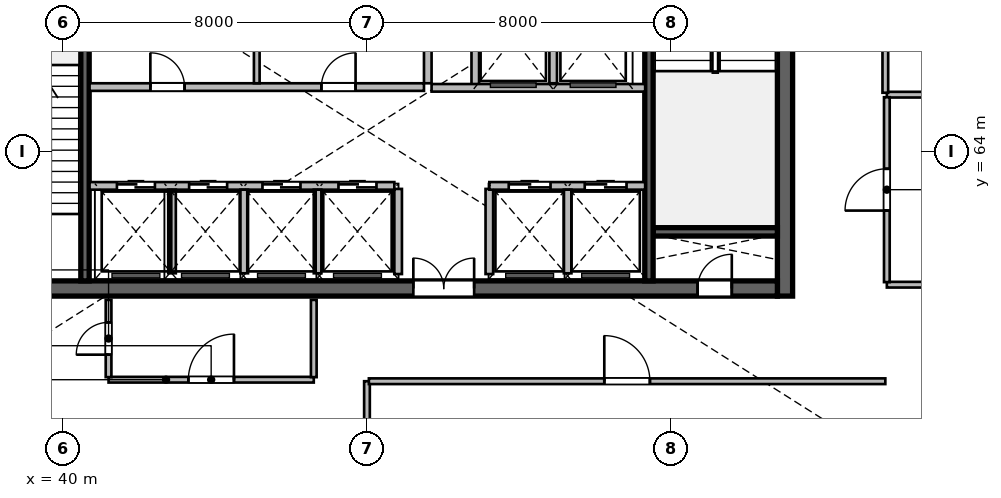
"""IFC4 building model, lengths in metres.
Left out: names, types, materials, properties, quantities, classifications, styles, units other than length and angle.
Written with IfcOpenShell. Run it as: python <this file> out.ifc"""

import sys

from ifc_helpers import new_model, si_unit, direction, frame, frame_2d, origin, place, context, subcontext, project, spatial, rectangle, extrude, source, transform, mapped, element, fill, save


model = new_model("IFC4")
c1 = context("Model", 3, precision=1e-05, world=origin(), true_north=direction((0.0, 1.0)))
c2 = subcontext(c1, "Body", "Model", "MODEL_VIEW")
j1 = project(units=[si_unit("LENGTHUNIT", "METRE"), si_unit("PLANEANGLEUNIT", "RADIAN")], contexts=[c1])
p1 = place(None, origin())
s1 = spatial("IfcSite", under=j1, at=p1, CompositionType="ELEMENT")
p2 = place(p1, origin())
s2 = spatial("IfcBuilding", under=s1, at=p2, CompositionType="ELEMENT")
p3 = place(p2, frame((0.0, 0.0, 312.6)))
s3 = spatial("IfcBuildingStorey", under=s2, at=p3, CompositionType="ELEMENT", Elevation=312.6)
m1 = source(origin(), c2, "Body", "SweptSolid", [
    extrude(rectangle(XDim=12.0, YDim=0.4, at=frame_2d((6.0, 0.0))), origin(), (0.0, 0.0, 1.0), 5.4),
])
p4 = place(p3, frame((59.0, 60.2, 0.0), z_axis=(0.0, 0.0, 1.0), x_axis=(0.0, 1.0, 0.0)))
e1 = element("IfcWall", 1, at=p4, inside=s3, PredefinedType="SHEAR", context=c2, shape_type="MappedRepresentation", body=[
    mapped(m1, transform((0.0, 0.0, 0.0), scale=1.0)),
])
m2 = source(origin(), c2, "Body", "SweptSolid", [
    extrude(rectangle(XDim=21.6, YDim=0.4, at=frame_2d((10.8, 0.0))), origin(), (0.0, 0.0, 1.0), 5.4),
])
p5 = place(p3, frame((37.2, 60.4, 0.0), z_axis=(0.0, 0.0, 1.0), x_axis=(1.0, 0.0, 0.0)))
e2 = element("IfcWall", 2, at=p5, inside=s3, PredefinedType="SHEAR", context=c2, shape_type="MappedRepresentation", body=[
    mapped(m2, transform((0.0, 0.0, 0.0), scale=1.0)),
])
p6 = place(p5, frame((1.1, 0.0, 0.0)))
e3 = element("IfcOpeningElement", 3, at=p6, cuts=e2, PredefinedType="OPENING", context=c2, shape_type="SweptSolid", body=[
    extrude(rectangle(XDim=1.15, YDim=2.15, at=frame_2d((0.575, 1.075))), frame((0.0, 0.21, 0.0), z_axis=(0.0, -1.0, 0.0), x_axis=(1.0, 0.0, 0.0)), (0.0, 0.0, 1.0), 0.42),
])
p7 = place(p5, frame((19.5, 0.0, 0.0)))
e4 = element("IfcOpeningElement", 4, at=p7, cuts=e2, PredefinedType="OPENING", context=c2, shape_type="SweptSolid", body=[
    extrude(rectangle(XDim=0.9, YDim=2.1, at=frame_2d((0.45, 1.05))), frame((0.0, 0.21, 0.0), z_axis=(0.0, -1.0, 0.0), x_axis=(1.0, 0.0, 0.0)), (0.0, 0.0, 1.0), 0.42),
])
p8 = place(p5, frame((12.02, 0.0, 0.0)))
e5 = element("IfcOpeningElement", 5, at=p8, cuts=e2, PredefinedType="OPENING", context=c2, shape_type="SweptSolid", body=[
    extrude(rectangle(XDim=1.6, YDim=2.15, at=frame_2d((0.8, 1.075))), frame((0.0, 0.21, 0.0), z_axis=(0.0, -1.0, 0.0), x_axis=(1.0, 0.0, 0.0)), (0.0, 0.0, 1.0), 0.42),
])
m3 = source(origin(), c2, "Body", "SweptSolid", [
    extrude(rectangle(XDim=3.27, YDim=0.22, at=frame_2d((1.635, 0.0))), origin(), (0.0, 0.0, 1.0), 5.4),
])
p9 = place(p3, frame((55.53, 61.89, 0.0), z_axis=(0.0, 0.0, 1.0), x_axis=(1.0, 0.0, 0.0)))
e6 = element("IfcWall", 6, at=p9, inside=s3, PredefinedType="SHEAR", context=c2, shape_type="MappedRepresentation", body=[
    mapped(m3, transform((0.0, 0.0, 0.0), scale=1.0)),
])
m4 = source(origin(), c2, "Body", "SweptSolid", [
    extrude(rectangle(XDim=11.2, YDim=0.22, at=frame_2d((5.6, 0.0))), origin(), (0.0, 0.0, 1.0), 5.4),
])
p10 = place(p3, frame((40.58, 60.6, 0.0), z_axis=(0.0, 0.0, 1.0), x_axis=(0.0, 1.0, 0.0)))
e7 = element("IfcWall", 7, at=p10, inside=s3, PredefinedType="SHEAR", context=c2, shape_type="MappedRepresentation", body=[
    mapped(m4, transform((0.0, 0.0, 0.0), scale=1.0)),
])
p11 = place(p3, frame((55.42, 60.6, 0.0), z_axis=(0.0, 0.0, 1.0), x_axis=(0.0, 1.0, 0.0)))
e8 = element("IfcWall", 8, at=p11, inside=s3, PredefinedType="SHEAR", context=c2, shape_type="MappedRepresentation", body=[
    mapped(m4, transform((0.0, 0.0, 0.0), scale=1.0)),
])
p12 = place(p11, frame((9.645, 0.0, 0.0)))
e9 = element("IfcOpeningElement", 9, at=p12, cuts=e8, PredefinedType="OPENING", context=c2, shape_type="SweptSolid", body=[
    extrude(rectangle(XDim=1.15, YDim=2.15, at=frame_2d((0.575, 1.075))), frame((0.0, 0.12, 0.0), z_axis=(0.0, -1.0, 0.0), x_axis=(1.0, 0.0, 0.0)), (0.0, 0.0, 1.0), 0.24),
])
m5 = source(origin(), c2, "Body", "SweptSolid", [
    extrude(rectangle(XDim=2.24, YDim=0.2, at=frame_2d((1.12, 0.0))), origin(), (0.0, 0.0, 1.0), 5.12),
])
for number, where, z_axis, x_axis in (
    (10, (48.82, 60.78, 0.0), (0.0, 0.0, 1.0), (0.0, 1.0, 0.0)),
    (11, (51.22, 60.78, 0.0), (0.0, 0.0, 1.0), (0.0, 1.0, 0.0)),
):
    element("IfcWall", number, at=place(p3, frame(where, z_axis=z_axis, x_axis=x_axis)), inside=s3, PredefinedType="SOLIDWALL", context=c2, shape_type="MappedRepresentation", body=[
        mapped(m5, transform((0.0, 0.0, 0.0), scale=1.0)),
    ])
m6 = source(origin(), c2, "Body", "SweptSolid", [
    extrude(rectangle(XDim=5.8, YDim=0.2, at=frame_2d((2.9, 0.0))), origin(), (0.0, 0.0, 1.0), 5.12),
])
p13 = place(p3, frame((49.6, 65.8, 0.0), z_axis=(0.0, 0.0, 1.0), x_axis=(0.0, 1.0, 0.0)))
e12 = element("IfcWall", 12, at=p13, inside=s3, PredefinedType="SOLIDWALL", context=c2, shape_type="MappedRepresentation", body=[
    mapped(m6, transform((0.0, 0.0, 0.0), scale=1.0)),
])
m7 = source(origin(), c2, "Body", "SweptSolid", [
    extrude(rectangle(XDim=2.58, YDim=0.2, at=frame_2d((1.29, 0.0))), origin(), (0.0, 0.0, 1.0), 5.12),
])
p14 = place(p3, frame((50.85, 65.68, 0.0), z_axis=(0.0, 0.0, 1.0), x_axis=(0.0, 1.0, 0.0)))
e13 = element("IfcWall", 13, at=p14, inside=s3, PredefinedType="SOLIDWALL", context=c2, shape_type="MappedRepresentation", body=[
    mapped(m7, transform((0.0, 0.0, 0.0), scale=1.0)),
])
m8 = source(origin(), c2, "Body", "SweptSolid", [
    extrude(rectangle(XDim=2.4, YDim=0.2, at=frame_2d((1.2, 0.0))), origin(), (0.0, 0.0, 1.0), 5.12),
])
p15 = place(p3, frame((52.9, 65.8, 0.0), z_axis=(0.0, 0.0, 1.0), x_axis=(0.0, 1.0, 0.0)))
e14 = element("IfcWall", 14, at=p15, inside=s3, PredefinedType="SOLIDWALL", context=c2, shape_type="MappedRepresentation", body=[
    mapped(m8, transform((0.0, 0.0, 0.0), scale=1.0)),
])
m9 = source(origin(), c2, "Body", "SweptSolid", [
    extrude(rectangle(XDim=5.62, YDim=0.2, at=frame_2d((2.81, 0.0))), origin(), (0.0, 0.0, 1.0), 5.12),
])
p16 = place(p3, frame((49.7, 65.68, 0.0), z_axis=(0.0, 0.0, 1.0), x_axis=(1.0, 0.0, 0.0)))
e15 = element("IfcWall", 15, at=p16, inside=s3, PredefinedType="SOLIDWALL", context=c2, shape_type="MappedRepresentation", body=[
    mapped(m9, transform((0.0, 0.0, 0.0), scale=1.0)),
])
m10 = source(origin(), c2, "Body", "SweptSolid", [
    extrude(rectangle(XDim=8.02, YDim=0.2, at=frame_2d((4.01, 0.0))), origin(), (0.0, 0.0, 1.0), 5.12),
])
p17 = place(p3, frame((40.7, 63.1, 0.0), z_axis=(0.0, 0.0, 1.0), x_axis=(1.0, 0.0, 0.0)))
e16 = element("IfcWall", 16, at=p17, inside=s3, PredefinedType="SOLIDWALL", context=c2, shape_type="MappedRepresentation", body=[
    mapped(m10, transform((0.0, 0.0, 0.0), scale=1.0)),
])
p18 = place(p17, frame((0.72, 0.0, 0.0)))
e17 = element("IfcOpeningElement", 17, at=p18, cuts=e16, PredefinedType="OPENING", context=c2, shape_type="SweptSolid", body=[
    extrude(rectangle(XDim=1.0, YDim=2.15, at=frame_2d((0.5, 1.075))), frame((0.0, 0.11, 0.0), z_axis=(0.0, -1.0, 0.0), x_axis=(1.0, 0.0, 0.0)), (0.0, 0.0, 1.0), 0.22),
])
p19 = place(p17, frame((2.62, 0.0, 0.0)))
e18 = element("IfcOpeningElement", 18, at=p19, cuts=e16, PredefinedType="OPENING", context=c2, shape_type="SweptSolid", body=[
    extrude(rectangle(XDim=1.0, YDim=2.15, at=frame_2d((0.5, 1.075))), frame((0.0, 0.11, 0.0), z_axis=(0.0, -1.0, 0.0), x_axis=(1.0, 0.0, 0.0)), (0.0, 0.0, 1.0), 0.22),
])
p20 = place(p17, frame((4.55, 0.0, 0.0)))
e19 = element("IfcOpeningElement", 19, at=p20, cuts=e16, PredefinedType="OPENING", context=c2, shape_type="SweptSolid", body=[
    extrude(rectangle(XDim=1.0, YDim=2.15, at=frame_2d((0.5, 1.075))), frame((0.0, 0.11, 0.0), z_axis=(0.0, -1.0, 0.0), x_axis=(1.0, 0.0, 0.0)), (0.0, 0.0, 1.0), 0.22),
])
p21 = place(p17, frame((6.55, 0.0, 0.0)))
e20 = element("IfcOpeningElement", 20, at=p21, cuts=e16, PredefinedType="OPENING", context=c2, shape_type="SweptSolid", body=[
    extrude(rectangle(XDim=1.0, YDim=2.15, at=frame_2d((0.5, 1.075))), frame((0.0, 0.11, 0.0), z_axis=(0.0, -1.0, 0.0), x_axis=(1.0, 0.0, 0.0)), (0.0, 0.0, 1.0), 0.22),
])
m11 = source(origin(), c2, "Body", "SweptSolid", [
    extrude(rectangle(XDim=4.1, YDim=0.2, at=frame_2d((2.05, 0.0))), origin(), (0.0, 0.0, 1.0), 5.12),
])
p22 = place(p3, frame((51.22, 63.1, 0.0), z_axis=(0.0, 0.0, 1.0), x_axis=(1.0, 0.0, 0.0)))
e21 = element("IfcWall", 21, at=p22, inside=s3, PredefinedType="SOLIDWALL", context=c2, shape_type="MappedRepresentation", body=[
    mapped(m11, transform((0.0, 0.0, 0.0), scale=1.0)),
])
p23 = place(p22, frame((0.51, 0.0, 0.0)))
e22 = element("IfcOpeningElement", 22, at=p23, cuts=e21, PredefinedType="OPENING", context=c2, shape_type="SweptSolid", body=[
    extrude(rectangle(XDim=1.1, YDim=2.15, at=frame_2d((0.55, 1.075))), frame((0.0, 0.11, 0.0), z_axis=(0.0, -1.0, 0.0), x_axis=(1.0, 0.0, 0.0)), (0.0, 0.0, 1.0), 0.22),
])
p24 = place(p22, frame((2.51, 0.0, 0.0)))
e23 = element("IfcOpeningElement", 23, at=p24, cuts=e21, PredefinedType="OPENING", context=c2, shape_type="SweptSolid", body=[
    extrude(rectangle(XDim=1.1, YDim=2.15, at=frame_2d((0.55, 1.075))), frame((0.0, 0.11, 0.0), z_axis=(0.0, -1.0, 0.0), x_axis=(1.0, 0.0, 0.0)), (0.0, 0.0, 1.0), 0.22),
])
m12 = source(origin(), c2, "Body", "SweptSolid", [
    extrude(rectangle(XDim=2.2, YDim=0.2, at=frame_2d((1.1, 0.0))), origin(), (0.0, 0.0, 1.0), 5.12),
])
for number, where, z_axis, x_axis in (
    (24, (42.87, 60.8, 0.0), (0.0, 0.0, 1.0), (0.0, 1.0, 0.0)),
    (25, (44.77, 60.8, 0.0), (0.0, 0.0, 1.0), (0.0, 1.0, 0.0)),
    (26, (46.7, 60.8, 0.0), (0.0, 0.0, 1.0), (0.0, 1.0, 0.0)),
    (27, (53.28, 60.8, 0.0), (0.0, 0.0, 1.0), (0.0, 1.0, 0.0)),
):
    element("IfcWall", number, at=place(p3, frame(where, z_axis=z_axis, x_axis=x_axis)), inside=s3, PredefinedType="SOLIDWALL", context=c2, shape_type="MappedRepresentation", body=[
        mapped(m12, transform((0.0, 0.0, 0.0), scale=1.0)),
    ])
m13 = source(origin(), c2, "Body", "SweptSolid", [
    extrude(rectangle(XDim=8.8, YDim=0.2, at=frame_2d((4.4, 0.0))), origin(), (0.0, 0.0, 1.0), 5.12),
])
p25 = place(p3, frame((40.7, 65.7, 0.0), z_axis=(0.0, 0.0, 1.0), x_axis=(1.0, 0.0, 0.0)))
e28 = element("IfcWall", 28, at=p25, inside=s3, PredefinedType="SOLIDWALL", context=c2, shape_type="MappedRepresentation", body=[
    mapped(m13, transform((0.0, 0.0, 0.0), scale=1.0)),
])
p26 = place(p25, frame((1.6, 0.0, 0.0)))
e29 = element("IfcOpeningElement", 29, at=p26, cuts=e28, PredefinedType="OPENING", context=c2, shape_type="SweptSolid", body=[
    extrude(rectangle(XDim=0.9, YDim=2.1, at=frame_2d((0.45, 1.05))), frame((0.0, 0.11, 0.0), z_axis=(0.0, -1.0, 0.0), x_axis=(1.0, 0.0, 0.0)), (0.0, 0.0, 1.0), 0.22),
])
p27 = place(p25, frame((6.1, 0.0, 0.0)))
e30 = element("IfcOpeningElement", 30, at=p27, cuts=e28, PredefinedType="OPENING", context=c2, shape_type="SweptSolid", body=[
    extrude(rectangle(XDim=0.9, YDim=2.1, at=frame_2d((0.45, 1.05))), frame((0.0, 0.11, 0.0), z_axis=(0.0, -1.0, 0.0), x_axis=(1.0, 0.0, 0.0)), (0.0, 0.0, 1.0), 0.22),
])
m14 = source(origin(), c2, "Body", "SweptSolid", [
    extrude(rectangle(XDim=2.4, YDim=0.15, at=frame_2d((1.2, 0.0))), origin(), (0.0, 0.0, 1.0), 5.12),
])
p28 = place(p3, frame((45.1, 65.8, 0.0), z_axis=(0.0, 0.0, 1.0), x_axis=(0.0, 1.0, 0.0)))
e31 = element("IfcWall", 31, at=p28, inside=s3, PredefinedType="PARTITIONING", context=c2, shape_type="MappedRepresentation", body=[
    mapped(m14, transform((0.0, 0.0, 0.0), scale=1.0)),
])
m15 = source(origin(), c2, "Body", "SweptSolid", [
    extrude(rectangle(XDim=5.4, YDim=0.15, at=frame_2d((2.7, 0.0))), origin(), (0.0, 0.0, 1.0), 5.12),
])
p29 = place(p3, frame((41.2, 58.0, 0.0), z_axis=(0.0, 0.0, 1.0), x_axis=(1.0, 0.0, 0.0)))
e32 = element("IfcWall", 32, at=p29, inside=s3, PredefinedType="PARTITIONING", context=c2, shape_type="MappedRepresentation", body=[
    mapped(m15, transform((0.0, 0.0, 0.0), scale=1.0)),
])
p30 = place(p29, frame((2.1, 0.0, 0.0)))
e33 = element("IfcOpeningElement", 33, at=p30, cuts=e32, PredefinedType="OPENING", context=c2, shape_type="SweptSolid", body=[
    extrude(rectangle(XDim=1.2, YDim=2.15, at=frame_2d((0.6, 1.075))), frame((0.0, 0.085, 0.0), z_axis=(0.0, -1.0, 0.0), x_axis=(1.0, 0.0, 0.0)), (0.0, 0.0, 1.0), 0.17),
])
m16 = source(origin(), c2, "Body", "SweptSolid", [
    extrude(rectangle(XDim=2.033, YDim=0.15, at=frame_2d((1.016, 0.0))), origin(), (0.0, 0.0, 1.0), 5.12),
])
p31 = place(p3, frame((41.2, 58.067, 0.0), z_axis=(0.0, 0.0, 1.0), x_axis=(0.0, 1.0, 0.0)))
e34 = element("IfcWall", 34, at=p31, inside=s3, PredefinedType="PARTITIONING", context=c2, shape_type="MappedRepresentation", body=[
    mapped(m16, transform((0.0, 0.0, 0.0), scale=1.0)),
])
p32 = place(p31, frame((0.591, 0.0, 0.0)))
e35 = element("IfcOpeningElement", 35, at=p32, cuts=e34, PredefinedType="OPENING", context=c2, shape_type="SweptSolid", body=[
    extrude(rectangle(XDim=0.85, YDim=2.1, at=frame_2d((0.425, 1.05))), frame((0.0, 0.085, 0.0), z_axis=(0.0, -1.0, 0.0), x_axis=(1.0, 0.0, 0.0)), (0.0, 0.0, 1.0), 0.17),
])
p33 = place(p3, frame((46.6, 58.067, 0.0), z_axis=(0.0, 0.0, 1.0), x_axis=(0.0, 1.0, 0.0)))
e36 = element("IfcWall", 36, at=p33, inside=s3, PredefinedType="PARTITIONING", context=c2, shape_type="MappedRepresentation", body=[
    mapped(m16, transform((0.0, 0.0, 0.0), scale=1.0)),
])
m17 = source(origin(), c2, "Body", "SweptSolid", [
    extrude(rectangle(XDim=3.92, YDim=0.15, at=frame_2d((1.96, 0.0))), origin(), (0.0, 0.0, 1.0), 5.12),
])
for number, where, z_axis, x_axis in (
    (37, (61.68, 60.5, 0.0), (0.0, 0.0, 1.0), (1.0, 0.0, 0.0)),
    (38, (61.68, 65.5, 0.0), (0.0, 0.0, 1.0), (1.0, 0.0, 0.0)),
):
    element("IfcWall", number, at=place(p3, frame(where, z_axis=z_axis, x_axis=x_axis)), inside=s3, PredefinedType="PARTITIONING", context=c2, shape_type="MappedRepresentation", body=[
        mapped(m17, transform((0.0, 0.0, 0.0), scale=1.0)),
    ])
m18 = source(origin(), c2, "Body", "SweptSolid", [
    extrude(rectangle(XDim=4.865, YDim=0.15, at=frame_2d((2.433, 0.0))), origin(), (0.0, 0.0, 1.0), 5.12),
])
p34 = place(p3, frame((61.68, 60.567, 0.0), z_axis=(0.0, 0.0, 1.0), x_axis=(0.0, 1.0, 0.0)))
e39 = element("IfcWall", 39, at=p34, inside=s3, PredefinedType="PARTITIONING", context=c2, shape_type="MappedRepresentation", body=[
    mapped(m18, transform((0.0, 0.0, 0.0), scale=1.0)),
])
p35 = place(p34, frame((1.883, 0.0, 0.0)))
e40 = element("IfcOpeningElement", 40, at=p35, cuts=e39, PredefinedType="OPENING", context=c2, shape_type="SweptSolid", body=[
    extrude(rectangle(XDim=1.1, YDim=2.15, at=frame_2d((0.55, 1.075))), frame((0.0, 0.085, 0.0), z_axis=(0.0, -1.0, 0.0), x_axis=(1.0, 0.0, 0.0)), (0.0, 0.0, 1.0), 0.17),
])
m19 = source(origin(), c2, "Body", "SweptSolid", [
    extrude(rectangle(XDim=3.141, YDim=0.15, at=frame_2d((1.571, 0.0))), origin(), (0.0, 0.0, 1.0), 4.794),
])
p36 = place(p3, frame((48.0, 54.819, 0.0), z_axis=(0.0, 0.0, 1.0), x_axis=(0.0, 1.0, 0.0)))
e41 = element("IfcWall", 41, at=p36, inside=s3, PredefinedType="PARTITIONING", context=c2, shape_type="MappedRepresentation", body=[
    mapped(m19, transform((0.0, 0.0, 0.0), scale=1.0)),
])
m20 = source(origin(), c2, "Body", "SweptSolid", [
    extrude(rectangle(XDim=13.59, YDim=0.15, at=frame_2d((6.795, 0.0))), origin(), (0.0, 0.0, 1.0), 4.853),
])
p37 = place(p3, frame((48.05, 57.96, 0.0), z_axis=(0.0, 0.0, 1.0), x_axis=(1.0, 0.0, 0.0)))
e42 = element("IfcWall", 42, at=p37, inside=s3, PredefinedType="PARTITIONING", context=c2, shape_type="MappedRepresentation", body=[
    mapped(m20, transform((0.0, 0.0, 0.0), scale=1.0)),
])
p38 = place(p37, frame((6.195, 0.0, 0.0)))
e43 = element("IfcOpeningElement", 43, at=p38, cuts=e42, PredefinedType="OPENING", context=c2, shape_type="SweptSolid", body=[
    extrude(rectangle(XDim=1.2, YDim=2.15, at=frame_2d((0.6, 1.075))), frame((0.0, 0.085, 0.0), z_axis=(0.0, -1.0, 0.0), x_axis=(1.0, 0.0, 0.0)), (0.0, 0.0, 1.0), 0.17),
])
m21 = source(origin(), c2, "Body", "SweptSolid", [
    extrude(rectangle(XDim=8.962, YDim=0.15, at=frame_2d((4.481, 0.0))), origin(), (0.0, 0.0, 1.0), 5.12),
])
p39 = place(p3, frame((61.64, 65.55, 0.0), z_axis=(0.0, 0.0, 1.0), x_axis=(0.0, 1.0, 0.0)))
e44 = element("IfcWall", 44, at=p39, inside=s3, PredefinedType="PARTITIONING", context=c2, shape_type="MappedRepresentation", body=[
    mapped(m21, transform((0.0, 0.0, 0.0), scale=1.0)),
])
m22 = source(origin(), c2, "Body", "SweptSolid", [
    extrude(rectangle(XDim=0.9, YDim=2.1, at=frame_2d((0.45, 1.05))), frame((0.0, 0.025, 0.0), z_axis=(0.0, -1.0, 0.0), x_axis=(1.0, 0.0, 0.0)), (0.0, 0.0, 1.0), 0.05),
])
p40 = place(p7, origin())
e45 = element("IfcDoor", 45, at=p40, inside=s3, OperationType="SINGLE_SWING_RIGHT", PredefinedType="DOOR", context=c2, shape_type="MappedRepresentation", body=[
    mapped(m22, transform((0.0, 0.0, 0.0), scale=1.0)),
])
fill(e4, e45)
m23 = source(origin(), c2, "Body", "SweptSolid", [
    extrude(rectangle(XDim=1.6, YDim=2.15, at=frame_2d((0.8, 1.075))), frame((0.0, 0.025, 0.0), z_axis=(0.0, -1.0, 0.0), x_axis=(1.0, 0.0, 0.0)), (0.0, 0.0, 1.0), 0.05),
])
p41 = place(p8, origin())
e46 = element("IfcDoor", 46, at=p41, inside=s3, OperationType="DOUBLE_DOOR_SINGLE_SWING", PredefinedType="DOOR", context=c2, shape_type="MappedRepresentation", body=[
    mapped(m23, transform((0.0, 0.0, 0.0), scale=1.0)),
])
fill(e5, e46)
m24 = source(origin(), c2, "Body", "SweptSolid", [
    extrude(rectangle(XDim=1.0, YDim=2.15, at=frame_2d((0.5, 1.075))), frame((0.0, 0.025, 0.0), z_axis=(0.0, -1.0, 0.0), x_axis=(1.0, 0.0, 0.0)), (0.0, 0.0, 1.0), 0.05),
])
p42 = place(p18, origin())
e47 = element("IfcDoor", 47, at=p42, inside=s3, OperationType="DOUBLE_DOOR_SLIDING", PredefinedType="DOOR", context=c2, shape_type="MappedRepresentation", body=[
    mapped(m24, transform((0.0, 0.0, 0.0), scale=1.0)),
])
fill(e17, e47)
p43 = place(p19, origin())
e48 = element("IfcDoor", 48, at=p43, inside=s3, OperationType="DOUBLE_DOOR_SLIDING", PredefinedType="DOOR", context=c2, shape_type="MappedRepresentation", body=[
    mapped(m24, transform((0.0, 0.0, 0.0), scale=1.0)),
])
fill(e18, e48)
p44 = place(p20, origin())
e49 = element("IfcDoor", 49, at=p44, inside=s3, OperationType="DOUBLE_DOOR_SLIDING", PredefinedType="DOOR", context=c2, shape_type="MappedRepresentation", body=[
    mapped(m24, transform((0.0, 0.0, 0.0), scale=1.0)),
])
fill(e19, e49)
p45 = place(p21, origin())
e50 = element("IfcDoor", 50, at=p45, inside=s3, OperationType="DOUBLE_DOOR_SLIDING", PredefinedType="DOOR", context=c2, shape_type="MappedRepresentation", body=[
    mapped(m24, transform((0.0, 0.0, 0.0), scale=1.0)),
])
fill(e20, e50)
m25 = source(origin(), c2, "Body", "SweptSolid", [
    extrude(rectangle(XDim=1.1, YDim=2.15, at=frame_2d((0.55, 1.075))), frame((0.0, 0.025, 0.0), z_axis=(0.0, -1.0, 0.0), x_axis=(1.0, 0.0, 0.0)), (0.0, 0.0, 1.0), 0.05),
])
p46 = place(p23, origin())
e51 = element("IfcDoor", 51, at=p46, inside=s3, OperationType="DOUBLE_DOOR_SLIDING", PredefinedType="DOOR", context=c2, shape_type="MappedRepresentation", body=[
    mapped(m25, transform((0.0, 0.0, 0.0), scale=1.0)),
])
fill(e22, e51)
p47 = place(p24, origin())
e52 = element("IfcDoor", 52, at=p47, inside=s3, OperationType="DOUBLE_DOOR_SLIDING", PredefinedType="DOOR", context=c2, shape_type="MappedRepresentation", body=[
    mapped(m25, transform((0.0, 0.0, 0.0), scale=1.0)),
])
fill(e23, e52)
p48 = place(p26, origin())
e53 = element("IfcDoor", 53, at=p48, inside=s3, OperationType="SINGLE_SWING_LEFT", PredefinedType="DOOR", context=c2, shape_type="MappedRepresentation", body=[
    mapped(m22, transform((0.0, 0.0, 0.0), scale=1.0)),
])
fill(e29, e53)
p49 = place(p27, origin())
e54 = element("IfcDoor", 54, at=p49, inside=s3, OperationType="SINGLE_SWING_RIGHT", PredefinedType="DOOR", context=c2, shape_type="MappedRepresentation", body=[
    mapped(m22, transform((0.0, 0.0, 0.0), scale=1.0)),
])
fill(e30, e54)
m26 = source(origin(), c2, "Body", "SweptSolid", [
    extrude(rectangle(XDim=0.85, YDim=2.1, at=frame_2d((0.425, 1.05))), frame((0.0, 0.025, 0.0), z_axis=(0.0, -1.0, 0.0), x_axis=(1.0, 0.0, 0.0)), (0.0, 0.0, 1.0), 0.05),
])
p50 = place(p32, origin())
e55 = element("IfcDoor", 55, at=p50, inside=s3, OperationType="SINGLE_SWING_LEFT", PredefinedType="DOOR", context=c2, shape_type="MappedRepresentation", body=[
    mapped(m26, transform((0.0, 0.0, 0.0), scale=1.0)),
])
fill(e35, e55)
m27 = source(origin(), c2, "Body", "SweptSolid", [
    extrude(rectangle(XDim=1.1, YDim=2.15, at=frame_2d((0.55, 1.075))), frame((0.0, 0.025, 0.0), z_axis=(0.0, -1.0, 0.0), x_axis=(1.0, 0.0, 0.0)), (0.0, 0.0, 1.0), 0.05),
])
p51 = place(p35, origin())
e56 = element("IfcDoor", 56, at=p51, inside=s3, OperationType="SINGLE_SWING_LEFT", PredefinedType="DOOR", context=c2, shape_type="MappedRepresentation", body=[
    mapped(m27, transform((0.0, 0.0, 0.0), scale=1.0)),
])
fill(e40, e56)
m28 = source(origin(), c2, "Body", "SweptSolid", [
    extrude(rectangle(XDim=1.2, YDim=2.15, at=frame_2d((0.6, 1.075))), frame((0.0, 0.025, 0.0), z_axis=(0.0, -1.0, 0.0), x_axis=(1.0, 0.0, 0.0)), (0.0, 0.0, 1.0), 0.05),
])
p52 = place(p30, origin())
e57 = element("IfcDoor", 57, at=p52, inside=s3, OperationType="SINGLE_SWING_RIGHT", PredefinedType="DOOR", context=c2, shape_type="MappedRepresentation", body=[
    mapped(m28, transform((0.0, 0.0, 0.0), scale=1.0)),
])
fill(e33, e57)
p53 = place(p38, origin())
e58 = element("IfcDoor", 58, at=p53, inside=s3, OperationType="SINGLE_SWING_LEFT", PredefinedType="DOOR", context=c2, shape_type="MappedRepresentation", body=[
    mapped(m28, transform((0.0, 0.0, 0.0), scale=1.0)),
])
fill(e43, e58)
save(model, sys.argv[1])
